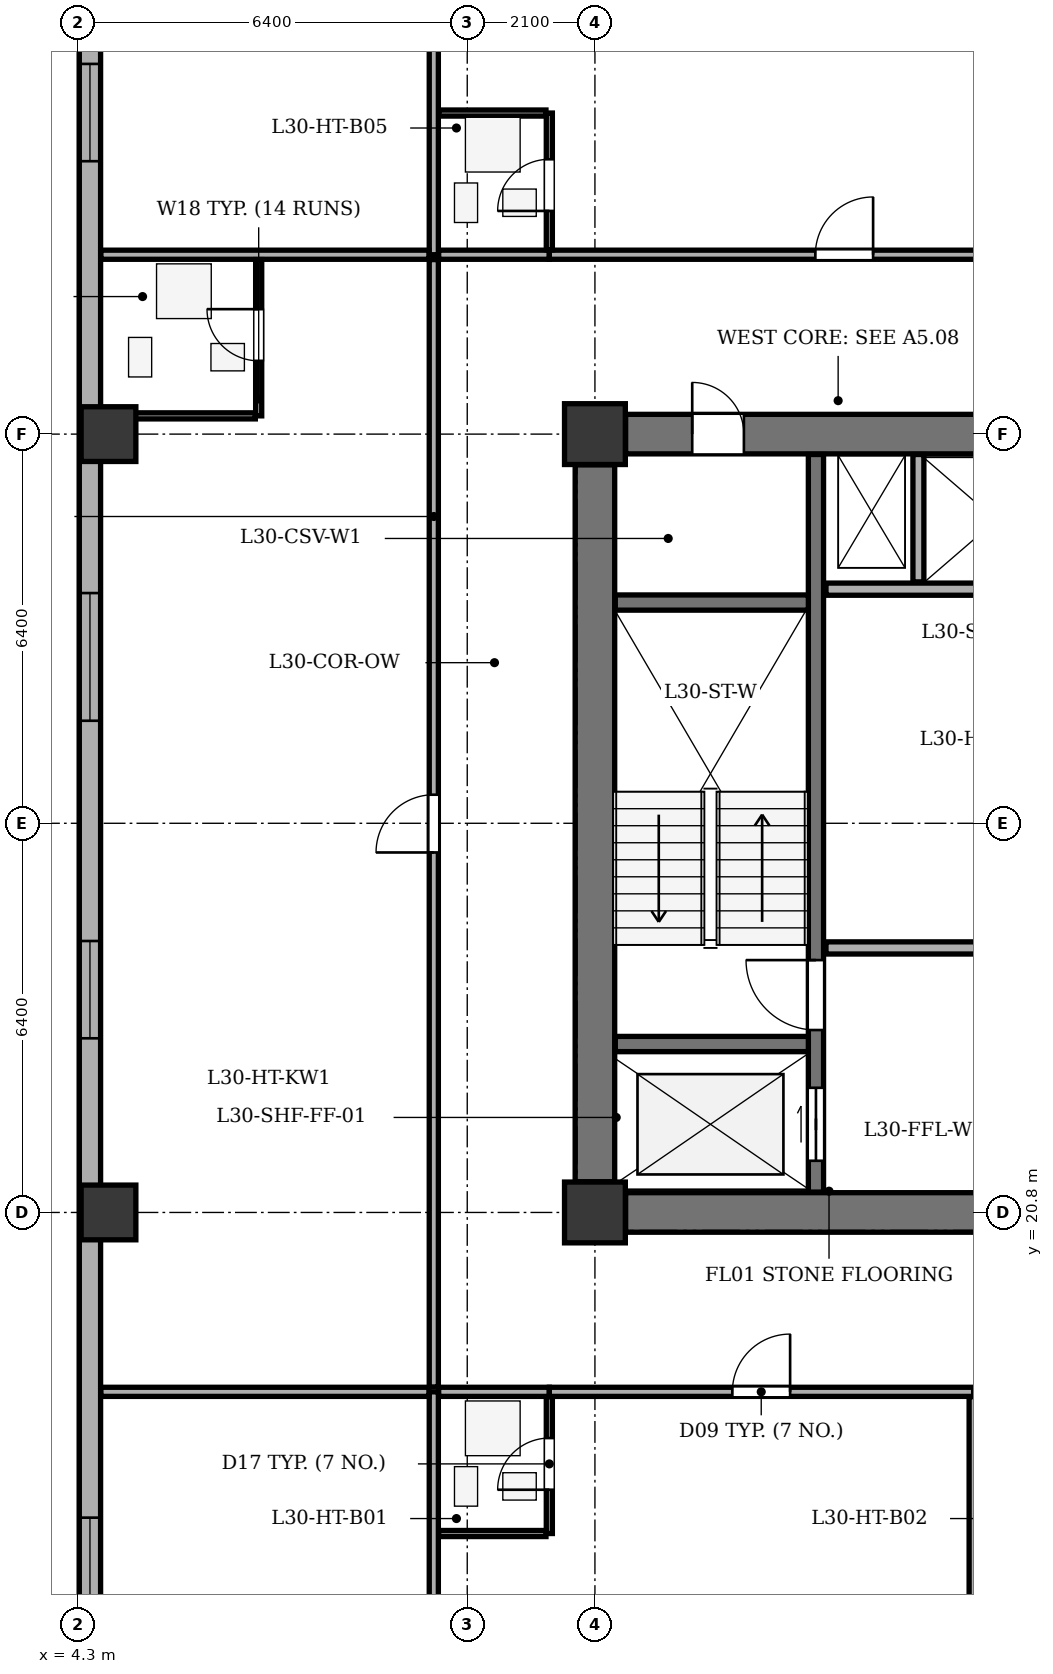
"""IFC4 building model, lengths in metres.
Left out: names, types, materials, properties, quantities, classifications, styles, units other than length and angle.
Written with IfcOpenShell. Run it as: python <this file> out.ifc"""

import sys

from ifc_helpers import new_model, si_unit, direction, frame, frame_2d, origin, origin_2d, place, context, subcontext, project, spatial, rectangle, extrude, element, fill, save


model = new_model("IFC4")
c1 = context("Model", 3, precision=1e-05, world=origin(), true_north=direction((0.0, 1.0)))
c2 = subcontext(c1, "Body", "Model", "MODEL_VIEW")
j1 = project(units=[si_unit("LENGTHUNIT", "METRE"), si_unit("PLANEANGLEUNIT", "RADIAN")], contexts=[c1])
p1 = place(None, origin())
s1 = spatial("IfcSite", under=j1, at=p1, CompositionType="ELEMENT")
p2 = place(p1, origin())
s2 = spatial("IfcBuilding", under=s1, at=p2, CompositionType="ELEMENT")
p3 = place(p2, frame((0.0, 0.0, 123.8)))
s3 = spatial("IfcBuildingStorey", under=s2, at=p3, CompositionType="ELEMENT", Elevation=123.8)
for number, where, z_axis, x_axis in (
    (1, (12.8, 20.8, 0.0), (0.0, 0.0, 1.0), (1.0, 0.0, 0.0)),
    (2, (12.8, 33.6, 0.0), (0.0, 0.0, 1.0), (1.0, 0.0, 0.0)),
):
    element("IfcColumn", number, at=place(p3, frame(where, z_axis=z_axis, x_axis=x_axis)), inside=s3, PredefinedType="COLUMN", context=c2, shape_type="SweptSolid", body=[
        extrude(rectangle(XDim=1.0, YDim=1.0, at=origin_2d()), origin(), (0.0, 0.0, 1.0), 3.5),
    ])
for number, where, z_axis, x_axis in (
    (3, (4.8, 20.8, 0.0), (0.0, 0.0, 1.0), (1.0, 0.0, 0.0)),
    (4, (4.8, 33.6, 0.0), (0.0, 0.0, 1.0), (1.0, 0.0, 0.0)),
):
    element("IfcColumn", number, at=place(p3, frame(where, z_axis=z_axis, x_axis=x_axis)), inside=s3, PredefinedType="COLUMN", context=c2, shape_type="SweptSolid", body=[
        extrude(rectangle(XDim=0.9, YDim=0.9, at=origin_2d()), origin(), (0.0, 0.0, 1.0), 3.5),
    ])
p4 = place(p3, frame((4.495, 6.5, 0.0), z_axis=(0.0, 0.0, 1.0), x_axis=(0.0, 1.0, 0.0)))
e5 = element("IfcWall", 5, at=p4, inside=s3, PredefinedType="STANDARD", context=c2, shape_type="SweptSolid", body=[
    extrude(rectangle(XDim=35.0, YDim=0.35, at=frame_2d((17.5, 0.0))), origin(), (0.0, 0.0, 1.0), 2.785),
])
p5 = place(p4, frame((2.595, 0.0, 0.75)))
e6 = element("IfcOpeningElement", 6, at=p5, cuts=e5, PredefinedType="OPENING", context=c2, shape_type="SweptSolid", body=[
    extrude(rectangle(XDim=1.6, YDim=1.75, at=frame_2d((0.8, 0.875))), frame((0.0, 0.185, 0.0), z_axis=(0.0, -1.0, 0.0), x_axis=(1.0, 0.0, 0.0)), (0.0, 0.0, 1.0), 0.37),
])
p6 = place(p4, frame((7.181, 0.0, 0.75)))
e7 = element("IfcOpeningElement", 7, at=p6, cuts=e5, PredefinedType="OPENING", context=c2, shape_type="SweptSolid", body=[
    extrude(rectangle(XDim=2.1, YDim=1.75, at=frame_2d((1.05, 0.875))), frame((0.0, 0.185, 0.0), z_axis=(0.0, -1.0, 0.0), x_axis=(1.0, 0.0, 0.0)), (0.0, 0.0, 1.0), 0.37),
])
p7 = place(p4, frame((17.164, 0.0, 0.75)))
e8 = element("IfcOpeningElement", 8, at=p7, cuts=e5, PredefinedType="OPENING", context=c2, shape_type="SweptSolid", body=[
    extrude(rectangle(XDim=1.6, YDim=1.75, at=frame_2d((0.8, 0.875))), frame((0.0, 0.185, 0.0), z_axis=(0.0, -1.0, 0.0), x_axis=(1.0, 0.0, 0.0)), (0.0, 0.0, 1.0), 0.37),
])
p8 = place(p4, frame((22.386, 0.0, 0.75)))
e9 = element("IfcOpeningElement", 9, at=p8, cuts=e5, PredefinedType="OPENING", context=c2, shape_type="SweptSolid", body=[
    extrude(rectangle(XDim=2.1, YDim=1.75, at=frame_2d((1.05, 0.875))), frame((0.0, 0.185, 0.0), z_axis=(0.0, -1.0, 0.0), x_axis=(1.0, 0.0, 0.0)), (0.0, 0.0, 1.0), 0.37),
])
p9 = place(p4, frame((31.588, 0.0, 0.75)))
e10 = element("IfcOpeningElement", 10, at=p9, cuts=e5, PredefinedType="OPENING", context=c2, shape_type="SweptSolid", body=[
    extrude(rectangle(XDim=1.6, YDim=1.75, at=frame_2d((0.8, 0.875))), frame((0.0, 0.185, 0.0), z_axis=(0.0, -1.0, 0.0), x_axis=(1.0, 0.0, 0.0)), (0.0, 0.0, 1.0), 0.37),
])
p10 = place(p3, frame((12.8, 21.305, 0.0), z_axis=(0.0, 0.0, 1.0), x_axis=(0.0, 1.0, 0.0)))
e11 = element("IfcWall", 11, at=p10, inside=s3, PredefinedType="SHEAR", context=c2, shape_type="SweptSolid", body=[
    extrude(rectangle(XDim=11.79, YDim=0.65, at=frame_2d((5.895, 0.0))), origin(), (0.0, 0.0, 1.0), 3.2),
])
p11 = place(p3, frame((13.305, 20.8, 0.0), z_axis=(0.0, 0.0, 1.0), x_axis=(1.0, 0.0, 0.0)))
e12 = element("IfcWall", 12, at=p11, inside=s3, PredefinedType="SHEAR", context=c2, shape_type="SweptSolid", body=[
    extrude(rectangle(XDim=6.99, YDim=0.65, at=frame_2d((3.495, 0.0))), origin(), (0.0, 0.0, 1.0), 3.2),
])
p12 = place(p3, frame((13.305, 33.6, 0.0), z_axis=(0.0, 0.0, 1.0), x_axis=(1.0, 0.0, 0.0)))
e13 = element("IfcWall", 13, at=p12, inside=s3, PredefinedType="SHEAR", context=c2, shape_type="SweptSolid", body=[
    extrude(rectangle(XDim=6.99, YDim=0.65, at=frame_2d((3.495, 0.0))), origin(), (0.0, 0.0, 1.0), 3.2),
])
p13 = place(p12, frame((1.095, 0.0, 0.0)))
e14 = element("IfcOpeningElement", 14, at=p13, cuts=e13, PredefinedType="OPENING", context=c2, shape_type="SweptSolid", body=[
    extrude(rectangle(XDim=0.85, YDim=2.02, at=frame_2d((0.425, 1.01))), frame((0.0, 0.335, 0.0), z_axis=(0.0, -1.0, 0.0), x_axis=(1.0, 0.0, 0.0)), (0.0, 0.0, 1.0), 0.67),
])
p14 = place(p3, frame((16.435, 21.135, 0.0), z_axis=(0.0, 0.0, 1.0), x_axis=(0.0, 1.0, 0.0)))
e15 = element("IfcWall", 15, at=p14, inside=s3, PredefinedType="SHEAR", context=c2, shape_type="SweptSolid", body=[
    extrude(rectangle(XDim=12.13, YDim=0.25, at=frame_2d((6.065, 0.0))), origin(), (0.0, 0.0, 1.0), 3.2),
])
p15 = place(p14, frame((0.515, 0.0, 0.0)))
e16 = element("IfcOpeningElement", 16, at=p15, cuts=e15, PredefinedType="OPENING", context=c2, shape_type="SweptSolid", body=[
    extrude(rectangle(XDim=1.2, YDim=2.15, at=frame_2d((0.6, 1.075))), frame((0.0, 0.135, 0.0), z_axis=(0.0, -1.0, 0.0), x_axis=(1.0, 0.0, 0.0)), (0.0, 0.0, 1.0), 0.27),
])
p16 = place(p14, frame((2.665, 0.0, 0.0)))
e17 = element("IfcOpeningElement", 17, at=p16, cuts=e15, PredefinedType="OPENING", context=c2, shape_type="SweptSolid", body=[
    extrude(rectangle(XDim=1.15, YDim=2.15, at=frame_2d((0.575, 1.075))), frame((0.0, 0.135, 0.0), z_axis=(0.0, -1.0, 0.0), x_axis=(1.0, 0.0, 0.0)), (0.0, 0.0, 1.0), 0.27),
])
for number, where, z_axis, x_axis in (
    (18, (13.135, 23.57, 0.0), (0.0, 0.0, 1.0), (1.0, 0.0, 0.0)),
    (19, (13.135, 30.83, 0.0), (0.0, 0.0, 1.0), (1.0, 0.0, 0.0)),
):
    element("IfcWall", number, at=place(p3, frame(where, z_axis=z_axis, x_axis=x_axis)), inside=s3, PredefinedType="SHEAR", context=c2, shape_type="SweptSolid", body=[
        extrude(rectangle(XDim=3.175, YDim=0.25, at=frame_2d((1.587, 0.0))), origin(), (0.0, 0.0, 1.0), 3.2),
    ])
for number, where, z_axis, x_axis in (
    (20, (16.6, 25.15, 0.0), (0.0, 0.0, 1.0), (1.0, 0.0, 0.0)),
    (21, (16.6, 31.05, 0.0), (0.0, 0.0, 1.0), (1.0, 0.0, 0.0)),
):
    element("IfcWall", number, at=place(p3, frame(where, z_axis=z_axis, x_axis=x_axis)), inside=s3, PredefinedType="SOLIDWALL", context=c2, shape_type="SweptSolid", body=[
        extrude(rectangle(XDim=3.85, YDim=0.2, at=frame_2d((1.925, 0.0))), origin(), (0.0, 0.0, 1.0), 3.2),
    ])
p17 = place(p3, frame((18.12, 31.17, 0.0), z_axis=(0.0, 0.0, 1.0), x_axis=(0.0, 1.0, 0.0)))
e22 = element("IfcWall", 22, at=p17, inside=s3, PredefinedType="PARTITIONING", context=c2, shape_type="SweptSolid", body=[
    extrude(rectangle(XDim=2.095, YDim=0.18, at=frame_2d((1.047, 0.0))), origin(), (0.0, 0.0, 1.0), 3.2),
])
p18 = place(p3, frame((10.15, 1.875, 0.0), z_axis=(0.0, 0.0, 1.0), x_axis=(0.0, 1.0, 0.0)))
e23 = element("IfcWall", 23, at=p18, inside=s3, PredefinedType="PARTITIONING", context=c2, shape_type="SweptSolid", body=[
    extrude(rectangle(XDim=15.975, YDim=0.15, at=frame_2d((7.988, 0.0))), origin(), (0.0, 0.0, 1.0), 3.2),
])
p19 = place(p3, frame((10.23, 17.85, 0.0), z_axis=(0.0, 0.0, 1.0), x_axis=(1.0, 0.0, 0.0)))
e24 = element("IfcWall", 24, at=p19, inside=s3, PredefinedType="PARTITIONING", context=c2, shape_type="SweptSolid", body=[
    extrude(rectangle(XDim=1.82, YDim=0.15, at=frame_2d((0.91, 0.0))), origin(), (0.0, 0.0, 1.0), 3.2),
])
p20 = place(p3, frame((12.05, 17.85, 0.0), z_axis=(0.0, 0.0, 1.0), x_axis=(1.0, 0.0, 0.0)))
e25 = element("IfcWall", 25, at=p20, inside=s3, PredefinedType="PARTITIONING", context=c2, shape_type="SweptSolid", body=[
    extrude(rectangle(XDim=6.979, YDim=0.15, at=frame_2d((3.49, 0.0))), origin(), (0.0, 0.0, 1.0), 3.2),
])
p21 = place(p20, frame((3.01, 0.0, 0.0)))
e26 = element("IfcOpeningElement", 26, at=p21, cuts=e25, PredefinedType="OPENING", context=c2, shape_type="SweptSolid", body=[
    extrude(rectangle(XDim=0.95, YDim=2.1, at=frame_2d((0.475, 1.05))), frame((0.0, 0.085, 0.0), z_axis=(0.0, -1.0, 0.0), x_axis=(1.0, 0.0, 0.0)), (0.0, 0.0, 1.0), 0.17),
])
p22 = place(p3, frame((12.05, 15.52, 0.0), z_axis=(0.0, 0.0, 1.0), x_axis=(0.0, 1.0, 0.0)))
e27 = element("IfcWall", 27, at=p22, inside=s3, PredefinedType="PARTITIONING", context=c2, shape_type="SweptSolid", body=[
    extrude(rectangle(XDim=2.25, YDim=0.1, at=frame_2d((1.125, 0.0))), origin(), (0.0, 0.0, 1.0), 3.2),
])
p23 = place(p22, frame((0.72, 0.0, 0.0)))
e28 = element("IfcOpeningElement", 28, at=p23, cuts=e27, PredefinedType="OPENING", context=c2, shape_type="SweptSolid", body=[
    extrude(rectangle(XDim=0.85, YDim=2.05, at=frame_2d((0.425, 1.025))), frame((0.0, 0.06, 0.0), z_axis=(0.0, -1.0, 0.0), x_axis=(1.0, 0.0, 0.0)), (0.0, 0.0, 1.0), 0.12),
])
p24 = place(p3, frame((10.23, 15.52, 0.0), z_axis=(0.0, 0.0, 1.0), x_axis=(1.0, 0.0, 0.0)))
e29 = element("IfcWall", 29, at=p24, inside=s3, PredefinedType="PARTITIONING", context=c2, shape_type="SweptSolid", body=[
    extrude(rectangle(XDim=1.765, YDim=0.1, at=frame_2d((0.883, 0.0))), origin(), (0.0, 0.0, 1.0), 3.2),
])
p25 = place(p3, frame((19.029, 1.875, 0.0), z_axis=(0.0, 0.0, 1.0), x_axis=(0.0, 1.0, 0.0)))
e30 = element("IfcWall", 30, at=p25, inside=s3, PredefinedType="PARTITIONING", context=c2, shape_type="SweptSolid", body=[
    extrude(rectangle(XDim=15.895, YDim=0.15, at=frame_2d((7.948, 0.0))), origin(), (0.0, 0.0, 1.0), 3.2),
])
p26 = place(p3, frame((10.15, 36.55, 0.0), z_axis=(0.0, 0.0, 1.0), x_axis=(0.0, 1.0, 0.0)))
e31 = element("IfcWall", 31, at=p26, inside=s3, PredefinedType="PARTITIONING", context=c2, shape_type="SweptSolid", body=[
    extrude(rectangle(XDim=9.575, YDim=0.15, at=frame_2d((4.788, 0.0))), origin(), (0.0, 0.0, 1.0), 3.2),
])
p27 = place(p3, frame((10.23, 36.55, 0.0), z_axis=(0.0, 0.0, 1.0), x_axis=(1.0, 0.0, 0.0)))
e32 = element("IfcWall", 32, at=p27, inside=s3, PredefinedType="PARTITIONING", context=c2, shape_type="SweptSolid", body=[
    extrude(rectangle(XDim=1.82, YDim=0.15, at=frame_2d((0.91, 0.0))), origin(), (0.0, 0.0, 1.0), 3.2),
])
p28 = place(p3, frame((12.05, 36.55, 0.0), z_axis=(0.0, 0.0, 1.0), x_axis=(1.0, 0.0, 0.0)))
e33 = element("IfcWall", 33, at=p28, inside=s3, PredefinedType="PARTITIONING", context=c2, shape_type="SweptSolid", body=[
    extrude(rectangle(XDim=9.711, YDim=0.15, at=frame_2d((4.855, 0.0))), origin(), (0.0, 0.0, 1.0), 3.2),
])
p29 = place(p28, frame((4.375, 0.0, 0.0)))
e34 = element("IfcOpeningElement", 34, at=p29, cuts=e33, PredefinedType="OPENING", context=c2, shape_type="SweptSolid", body=[
    extrude(rectangle(XDim=0.95, YDim=2.1, at=frame_2d((0.475, 1.05))), frame((0.0, 0.085, 0.0), z_axis=(0.0, -1.0, 0.0), x_axis=(1.0, 0.0, 0.0)), (0.0, 0.0, 1.0), 0.17),
])
p30 = place(p3, frame((12.05, 36.63, 0.0), z_axis=(0.0, 0.0, 1.0), x_axis=(0.0, 1.0, 0.0)))
e35 = element("IfcWall", 35, at=p30, inside=s3, PredefinedType="PARTITIONING", context=c2, shape_type="SweptSolid", body=[
    extrude(rectangle(XDim=2.25, YDim=0.1, at=frame_2d((1.125, 0.0))), origin(), (0.0, 0.0, 1.0), 3.2),
])
p31 = place(p30, frame((0.64, 0.0, 0.0)))
e36 = element("IfcOpeningElement", 36, at=p31, cuts=e35, PredefinedType="OPENING", context=c2, shape_type="SweptSolid", body=[
    extrude(rectangle(XDim=0.85, YDim=2.05, at=frame_2d((0.425, 1.025))), frame((0.0, 0.06, 0.0), z_axis=(0.0, -1.0, 0.0), x_axis=(1.0, 0.0, 0.0)), (0.0, 0.0, 1.0), 0.12),
])
p32 = place(p3, frame((10.23, 38.88, 0.0), z_axis=(0.0, 0.0, 1.0), x_axis=(1.0, 0.0, 0.0)))
e37 = element("IfcWall", 37, at=p32, inside=s3, PredefinedType="PARTITIONING", context=c2, shape_type="SweptSolid", body=[
    extrude(rectangle(XDim=1.765, YDim=0.1, at=frame_2d((0.883, 0.0))), origin(), (0.0, 0.0, 1.0), 3.2),
])
for number, where, z_axis, x_axis in (
    (38, (4.675, 17.85, 0.0), (0.0, 0.0, 1.0), (1.0, 0.0, 0.0)),
    (39, (4.675, 36.55, 0.0), (0.0, 0.0, 1.0), (1.0, 0.0, 0.0)),
):
    element("IfcWall", number, at=place(p3, frame(where, z_axis=z_axis, x_axis=x_axis)), inside=s3, PredefinedType="PARTITIONING", context=c2, shape_type="SweptSolid", body=[
        extrude(rectangle(XDim=5.395, YDim=0.15, at=frame_2d((2.698, 0.0))), origin(), (0.0, 0.0, 1.0), 3.2),
    ])
p33 = place(p3, frame((10.15, 17.93, 0.0), z_axis=(0.0, 0.0, 1.0), x_axis=(0.0, 1.0, 0.0)))
e40 = element("IfcWall", 40, at=p33, inside=s3, PredefinedType="PARTITIONING", context=c2, shape_type="SweptSolid", body=[
    extrude(rectangle(XDim=18.54, YDim=0.15, at=frame_2d((9.27, 0.0))), origin(), (0.0, 0.0, 1.0), 3.2),
])
p34 = place(p33, frame((8.79, 0.0, 0.0)))
e41 = element("IfcOpeningElement", 41, at=p34, cuts=e40, PredefinedType="OPENING", context=c2, shape_type="SweptSolid", body=[
    extrude(rectangle(XDim=0.95, YDim=2.1, at=frame_2d((0.475, 1.05))), frame((0.0, 0.085, 0.0), z_axis=(0.0, -1.0, 0.0), x_axis=(1.0, 0.0, 0.0)), (0.0, 0.0, 1.0), 0.17),
])
p35 = place(p3, frame((7.27, 33.9, 0.0), z_axis=(0.0, 0.0, 1.0), x_axis=(0.0, 1.0, 0.0)))
e42 = element("IfcWall", 42, at=p35, inside=s3, PredefinedType="PARTITIONING", context=c2, shape_type="SweptSolid", body=[
    extrude(rectangle(XDim=2.57, YDim=0.1, at=frame_2d((1.285, 0.0))), origin(), (0.0, 0.0, 1.0), 3.2),
])
p36 = place(p35, frame((0.905, 0.0, 0.0)))
e43 = element("IfcOpeningElement", 43, at=p36, cuts=e42, PredefinedType="OPENING", context=c2, shape_type="SweptSolid", body=[
    extrude(rectangle(XDim=0.85, YDim=2.05, at=frame_2d((0.425, 1.025))), frame((0.0, 0.06, 0.0), z_axis=(0.0, -1.0, 0.0), x_axis=(1.0, 0.0, 0.0)), (0.0, 0.0, 1.0), 0.12),
])
p37 = place(p3, frame((4.675, 33.9, 0.0), z_axis=(0.0, 0.0, 1.0), x_axis=(1.0, 0.0, 0.0)))
e44 = element("IfcWall", 44, at=p37, inside=s3, PredefinedType="PARTITIONING", context=c2, shape_type="SweptSolid", body=[
    extrude(rectangle(XDim=2.54, YDim=0.1, at=frame_2d((1.27, 0.0))), origin(), (0.0, 0.0, 1.0), 2.535),
])
p38 = place(p6, origin())
e45 = element("IfcWindow", 45, at=p38, inside=s3, PartitioningType="SINGLE_PANEL", PredefinedType="WINDOW", context=c2, shape_type="SweptSolid", body=[
    extrude(rectangle(XDim=2.1, YDim=1.75, at=frame_2d((1.05, 0.875))), frame((0.0, -0.01, 0.0), z_axis=(0.0, -1.0, 0.0), x_axis=(1.0, 0.0, 0.0)), (0.0, 0.0, 1.0), 0.06),
])
fill(e7, e45)
p39 = place(p7, origin())
e46 = element("IfcWindow", 46, at=p39, inside=s3, PartitioningType="SINGLE_PANEL", PredefinedType="WINDOW", context=c2, shape_type="SweptSolid", body=[
    extrude(rectangle(XDim=1.6, YDim=1.75, at=frame_2d((0.8, 0.875))), frame((0.0, -0.01, 0.0), z_axis=(0.0, -1.0, 0.0), x_axis=(1.0, 0.0, 0.0)), (0.0, 0.0, 1.0), 0.06),
])
fill(e8, e46)
p40 = place(p8, origin())
e47 = element("IfcWindow", 47, at=p40, inside=s3, PartitioningType="SINGLE_PANEL", PredefinedType="WINDOW", context=c2, shape_type="SweptSolid", body=[
    extrude(rectangle(XDim=2.1, YDim=1.75, at=frame_2d((1.05, 0.875))), frame((0.0, -0.01, 0.0), z_axis=(0.0, -1.0, 0.0), x_axis=(1.0, 0.0, 0.0)), (0.0, 0.0, 1.0), 0.06),
])
fill(e9, e47)
p41 = place(p9, origin())
e48 = element("IfcWindow", 48, at=p41, inside=s3, PartitioningType="SINGLE_PANEL", PredefinedType="WINDOW", context=c2, shape_type="SweptSolid", body=[
    extrude(rectangle(XDim=1.6, YDim=1.75, at=frame_2d((0.8, 0.875))), frame((0.0, -0.01, 0.0), z_axis=(0.0, -1.0, 0.0), x_axis=(1.0, 0.0, 0.0)), (0.0, 0.0, 1.0), 0.06),
])
fill(e10, e48)
p42 = place(p13, origin())
e49 = element("IfcDoor", 49, at=p42, inside=s3, OperationType="SINGLE_SWING_LEFT", PredefinedType="DOOR", context=c2, shape_type="SweptSolid", body=[
    extrude(rectangle(XDim=0.85, YDim=2.02, at=frame_2d((0.425, 1.01))), frame((0.0, 0.025, 0.0), z_axis=(0.0, -1.0, 0.0), x_axis=(1.0, 0.0, 0.0)), (0.0, 0.0, 1.0), 0.05),
])
fill(e14, e49)
p43 = place(p15, origin())
e50 = element("IfcDoor", 50, at=p43, inside=s3, OperationType="DOUBLE_DOOR_SLIDING", PredefinedType="DOOR", context=c2, shape_type="SweptSolid", body=[
    extrude(rectangle(XDim=1.2, YDim=2.15, at=frame_2d((0.6, 1.075))), frame((0.0, 0.025, 0.0), z_axis=(0.0, -1.0, 0.0), x_axis=(1.0, 0.0, 0.0)), (0.0, 0.0, 1.0), 0.05),
])
fill(e16, e50)
p44 = place(p16, origin())
e51 = element("IfcDoor", 51, at=p44, inside=s3, OperationType="SINGLE_SWING_RIGHT", PredefinedType="DOOR", context=c2, shape_type="SweptSolid", body=[
    extrude(rectangle(XDim=1.15, YDim=2.15, at=frame_2d((0.575, 1.075))), frame((0.0, 0.025, 0.0), z_axis=(0.0, -1.0, 0.0), x_axis=(1.0, 0.0, 0.0)), (0.0, 0.0, 1.0), 0.05),
])
fill(e17, e51)
p45 = place(p23, origin())
e52 = element("IfcDoor", 52, at=p45, inside=s3, OperationType="SINGLE_SWING_LEFT", PredefinedType="DOOR", context=c2, shape_type="SweptSolid", body=[
    extrude(rectangle(XDim=0.85, YDim=2.05, at=frame_2d((0.425, 1.025))), frame((0.0, 0.025, 0.0), z_axis=(0.0, -1.0, 0.0), x_axis=(1.0, 0.0, 0.0)), (0.0, 0.0, 1.0), 0.05),
])
fill(e28, e52)
p46 = place(p21, origin())
e53 = element("IfcDoor", 53, at=p46, inside=s3, OperationType="SINGLE_SWING_RIGHT", PredefinedType="DOOR", context=c2, shape_type="SweptSolid", body=[
    extrude(rectangle(XDim=0.95, YDim=2.1, at=frame_2d((0.475, 1.05))), frame((0.0, 0.025, 0.0), z_axis=(0.0, -1.0, 0.0), x_axis=(1.0, 0.0, 0.0)), (0.0, 0.0, 1.0), 0.05),
])
fill(e26, e53)
p47 = place(p31, origin())
e54 = element("IfcDoor", 54, at=p47, inside=s3, OperationType="SINGLE_SWING_LEFT", PredefinedType="DOOR", context=c2, shape_type="SweptSolid", body=[
    extrude(rectangle(XDim=0.85, YDim=2.05, at=frame_2d((0.425, 1.025))), frame((0.0, 0.025, 0.0), z_axis=(0.0, -1.0, 0.0), x_axis=(1.0, 0.0, 0.0)), (0.0, 0.0, 1.0), 0.05),
])
fill(e36, e54)
p48 = place(p29, origin())
e55 = element("IfcDoor", 55, at=p48, inside=s3, OperationType="SINGLE_SWING_RIGHT", PredefinedType="DOOR", context=c2, shape_type="SweptSolid", body=[
    extrude(rectangle(XDim=0.95, YDim=2.1, at=frame_2d((0.475, 1.05))), frame((0.0, 0.025, 0.0), z_axis=(0.0, -1.0, 0.0), x_axis=(1.0, 0.0, 0.0)), (0.0, 0.0, 1.0), 0.05),
])
fill(e34, e55)
p49 = place(p36, origin())
e56 = element("IfcDoor", 56, at=p49, inside=s3, OperationType="SINGLE_SWING_RIGHT", PredefinedType="DOOR", context=c2, shape_type="SweptSolid", body=[
    extrude(rectangle(XDim=0.85, YDim=2.05, at=frame_2d((0.425, 1.025))), frame((0.0, 0.025, 0.0), z_axis=(0.0, -1.0, 0.0), x_axis=(1.0, 0.0, 0.0)), (0.0, 0.0, 1.0), 0.05),
])
fill(e43, e56)
p50 = place(p34, origin())
e57 = element("IfcDoor", 57, at=p50, inside=s3, OperationType="SINGLE_SWING_LEFT", PredefinedType="DOOR", context=c2, shape_type="SweptSolid", body=[
    extrude(rectangle(XDim=0.95, YDim=2.1, at=frame_2d((0.475, 1.05))), frame((0.0, 0.025, 0.0), z_axis=(0.0, -1.0, 0.0), x_axis=(1.0, 0.0, 0.0)), (0.0, 0.0, 1.0), 0.05),
])
fill(e41, e57)
save(model, sys.argv[1])
